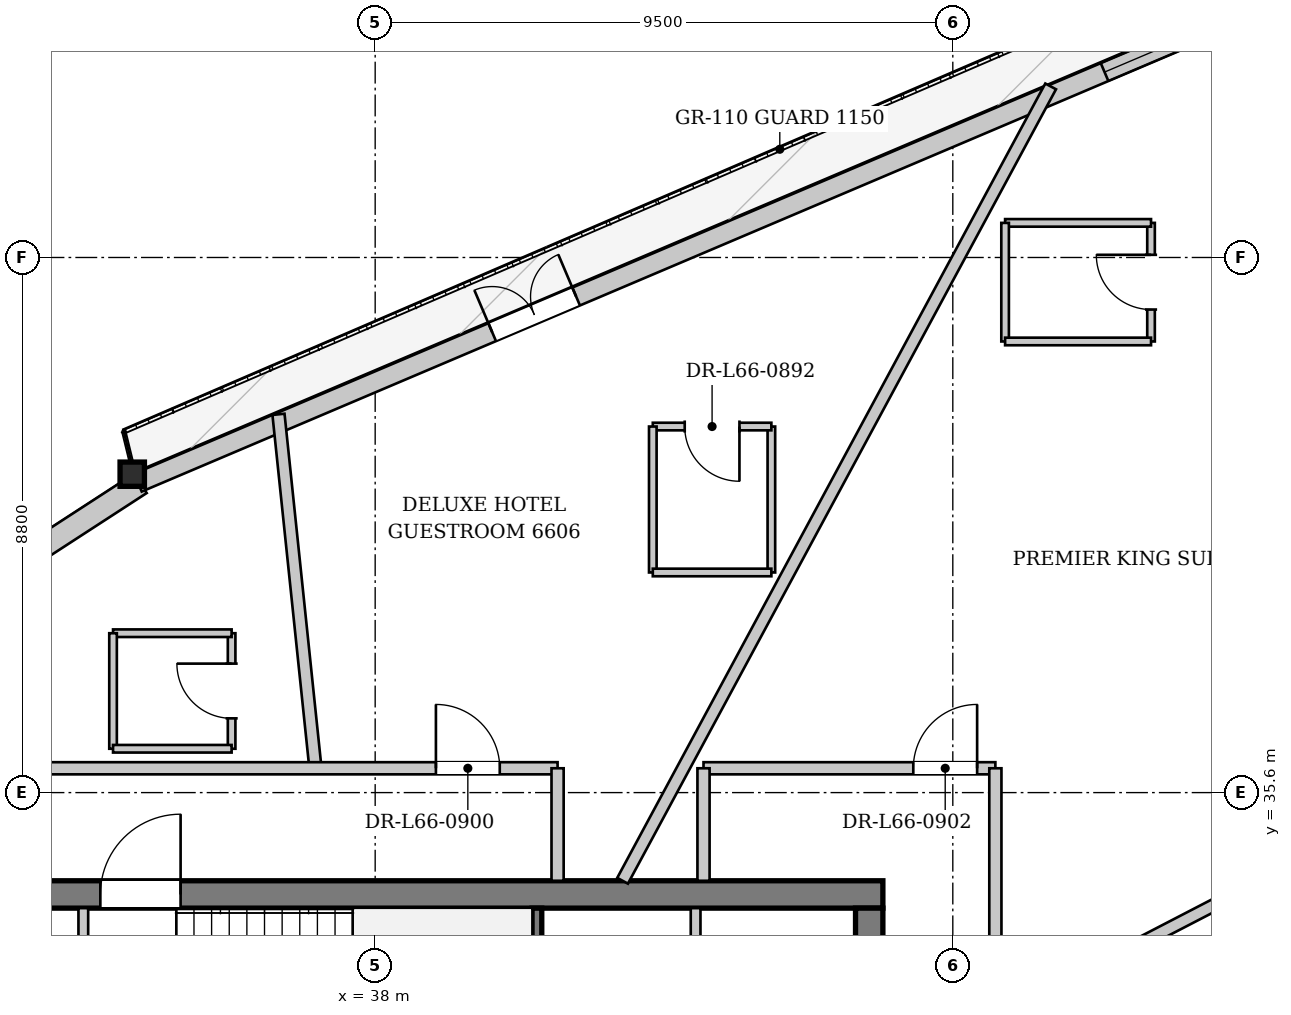
"""IFC4 building model, lengths in metres.
Left out: names, types, materials, properties, quantities, classifications, styles, units other than length and angle.
Written with IfcOpenShell. Run it as: python <this file> out.ifc"""

import sys

from ifc_helpers import new_model, si_unit, direction, frame, frame_2d, origin, origin_2d, place, context, subcontext, project, spatial, rectangle, i_section, extrude, source, transform, mapped, element, fill, save


model = new_model("IFC4")
c1 = context("Model", 3, precision=1e-05, world=origin(), true_north=direction((0.0, 1.0)))
c2 = subcontext(c1, "Body", "Model", "MODEL_VIEW")
j1 = project(units=[si_unit("LENGTHUNIT", "METRE"), si_unit("PLANEANGLEUNIT", "RADIAN")], contexts=[c1])
p1 = place(None, origin())
s1 = spatial("IfcSite", under=j1, at=p1, CompositionType="ELEMENT")
p2 = place(p1, origin())
s2 = spatial("IfcBuilding", under=s1, at=p2, CompositionType="ELEMENT")
p3 = place(p2, frame((0.0, 0.0, 248.9)))
s3 = spatial("IfcBuildingStorey", under=s2, at=p3, CompositionType="ELEMENT", Elevation=248.9)
m1 = source(origin(), c2, "Body", "SweptSolid", [
    extrude(i_section(OverallWidth=0.401, OverallDepth=0.399, WebThickness=0.022, FlangeThickness=0.034, at=origin_2d()), origin(), (0.0, 0.0, 1.0), 3.436),
])
p4 = place(p3, frame((34.036, 40.845, 0.0), z_axis=(-0.018120454418, -0.0051163636, 0.999822720264), x_axis=(0.271729070223, -0.962373790372, 0.0)))
e1 = element("IfcColumn", 1, at=p4, inside=s3, PredefinedType="COLUMN", context=c2, shape_type="MappedRepresentation", body=[
    mapped(m1, transform((0.0, 0.0, 0.0), x_axis=(1.0, 0.0, 0.0), y_axis=(0.0, 1.0, 0.0), z_axis=(0.0, 0.0, 1.0), scale=1.0)),
])
p5 = place(p3, frame((15.584, 28.637, 0.0), z_axis=(0.0, 0.0, 1.0), x_axis=(0.838692120157, 0.544605846083, 0.0)))
e2 = element("IfcWall", 2, at=p5, inside=s3, PredefinedType="SOLIDWALL", context=c2, shape_type="SweptSolid", body=[
    extrude(rectangle(XDim=22.124, YDim=0.38, at=frame_2d((11.062, 0.0))), origin(), (0.0, 0.0, 1.0), 2.872),
])
p6 = place(p5, frame((5.595, 0.0, 0.65)))
e3 = element("IfcOpeningElement", 3, at=p6, cuts=e2, PredefinedType="OPENING", context=c2, shape_type="SweptSolid", body=[
    extrude(rectangle(XDim=1.2, YDim=1.5, at=frame_2d((0.6, 0.75))), frame((0.0, 0.2, 0.0), z_axis=(0.0, -1.0, 0.0), x_axis=(1.0, 0.0, 0.0)), (0.0, 0.0, 1.0), 0.4),
])
p7 = place(p5, frame((16.929, 0.0, 0.65)))
e4 = element("IfcOpeningElement", 4, at=p7, cuts=e2, PredefinedType="OPENING", context=c2, shape_type="SweptSolid", body=[
    extrude(rectangle(XDim=1.2, YDim=1.5, at=frame_2d((0.6, 0.75))), frame((0.0, 0.2, 0.0), z_axis=(0.0, -1.0, 0.0), x_axis=(1.0, 0.0, 0.0)), (0.0, 0.0, 1.0), 0.4),
])
p8 = place(p3, frame((34.098, 40.698, 0.0), z_axis=(0.0, 0.0, 1.0), x_axis=(0.920439131347, 0.390885923877, 0.0)))
e5 = element("IfcWall", 5, at=p8, inside=s3, PredefinedType="SOLIDWALL", context=c2, shape_type="SweptSolid", body=[
    extrude(rectangle(XDim=22.124, YDim=0.32, at=frame_2d((11.062, 0.0))), origin(), (0.0, 0.0, 1.0), 2.872),
])
p9 = place(p8, frame((6.33, 0.0, 0.0)))
e6 = element("IfcOpeningElement", 6, at=p9, cuts=e5, PredefinedType="OPENING", context=c2, shape_type="SweptSolid", body=[
    extrude(rectangle(XDim=1.5, YDim=2.3, at=frame_2d((0.75, 1.15))), frame((0.0, 0.17, 0.0), z_axis=(0.0, -1.0, 0.0), x_axis=(1.0, 0.0, 0.0)), (0.0, 0.0, 1.0), 0.34),
])
p10 = place(p8, frame((17.272, 0.0, 0.402)))
e7 = element("IfcOpeningElement", 7, at=p10, cuts=e5, PredefinedType="OPENING", context=c2, shape_type="SweptSolid", body=[
    extrude(rectangle(XDim=2.6, YDim=2.35, at=frame_2d((1.3, 1.175))), frame((0.0, 0.17, 0.0), z_axis=(0.0, -1.0, 0.0), x_axis=(1.0, 0.0, 0.0)), (0.0, 0.0, 1.0), 0.34),
])
p11 = place(p3, frame((29.65, 33.925, 0.0), z_axis=(0.0, 0.0, 1.0), x_axis=(1.0, 0.0, 0.0)))
e8 = element("IfcWall", 8, at=p11, inside=s3, PredefinedType="SHEAR", context=c2, shape_type="SweptSolid", body=[
    extrude(rectangle(XDim=16.7, YDim=0.45, at=frame_2d((8.35, 0.0))), origin(), (0.0, 0.0, 1.0), 3.38),
])
p12 = place(p11, frame((1.45, 0.0, 0.0)))
e9 = element("IfcOpeningElement", 9, at=p12, cuts=e8, PredefinedType="OPENING", context=c2, shape_type="SweptSolid", body=[
    extrude(rectangle(XDim=0.95, YDim=2.1, at=frame_2d((0.475, 1.05))), frame((0.0, 0.235, 0.0), z_axis=(0.0, -1.0, 0.0), x_axis=(1.0, 0.0, 0.0)), (0.0, 0.0, 1.0), 0.47),
])
p13 = place(p11, frame((3.83, 0.0, 0.0)))
e10 = element("IfcOpeningElement", 10, at=p13, cuts=e8, PredefinedType="OPENING", context=c2, shape_type="SweptSolid", body=[
    extrude(rectangle(XDim=1.32, YDim=2.2, at=frame_2d((0.66, 1.1))), frame((0.0, 0.235, 0.0), z_axis=(0.0, -1.0, 0.0), x_axis=(1.0, 0.0, 0.0)), (0.0, 0.0, 1.0), 0.47),
])
p14 = place(p3, frame((46.125, 33.7, 0.0), z_axis=(0.0, 0.0, 1.0), x_axis=(0.0, -1.0, 0.0)))
e11 = element("IfcWall", 11, at=p14, inside=s3, PredefinedType="SHEAR", context=c2, shape_type="SweptSolid", body=[
    extrude(rectangle(XDim=14.2, YDim=0.45, at=frame_2d((7.1, 0.0))), origin(), (0.0, 0.0, 1.0), 3.38),
])
p15 = place(p14, frame((5.18, 0.0, 0.0)))
e12 = element("IfcOpeningElement", 12, at=p15, cuts=e11, PredefinedType="OPENING", context=c2, shape_type="SweptSolid", body=[
    extrude(rectangle(XDim=1.6, YDim=2.2, at=frame_2d((0.8, 1.1))), frame((0.0, 0.235, 0.0), z_axis=(0.0, -1.0, 0.0), x_axis=(1.0, 0.0, 0.0)), (0.0, 0.0, 1.0), 0.47),
])
p16 = place(p14, frame((2.05, 0.0, 0.0)))
e13 = element("IfcOpeningElement", 13, at=p16, cuts=e11, PredefinedType="OPENING", context=c2, shape_type="SweptSolid", body=[
    extrude(rectangle(XDim=0.95, YDim=2.1, at=frame_2d((0.475, 1.05))), frame((0.0, 0.235, 0.0), z_axis=(0.0, -1.0, 0.0), x_axis=(1.0, 0.0, 0.0)), (0.0, 0.0, 1.0), 0.47),
])
p17 = place(p3, frame((40.66, 30.6, 0.0), z_axis=(0.0, 0.0, 1.0), x_axis=(0.0, 1.0, 0.0)))
e14 = element("IfcWall", 14, at=p17, inside=s3, PredefinedType="PARTITIONING", context=c2, shape_type="SweptSolid", body=[
    extrude(rectangle(XDim=3.1, YDim=0.16, at=frame_2d((1.55, 0.0))), origin(), (0.0, 0.0, 1.0), 3.38),
])
p18 = place(p3, frame((33.2, 28.44, 0.0), z_axis=(0.0, 0.0, 1.0), x_axis=(0.0, 1.0, 0.0)))
e15 = element("IfcWall", 15, at=p18, inside=s3, PredefinedType="PARTITIONING", context=c2, shape_type="SweptSolid", body=[
    extrude(rectangle(XDim=5.26, YDim=0.16, at=frame_2d((2.63, 0.0))), origin(), (0.0, 0.0, 1.0), 3.38),
])
p19 = place(p3, frame((43.27, 30.68, 0.0), z_axis=(0.0, 0.0, 1.0), x_axis=(0.0, 1.0, 0.0)))
e16 = element("IfcWall", 16, at=p19, inside=s3, PredefinedType="PARTITIONING", context=c2, shape_type="SweptSolid", body=[
    extrude(rectangle(XDim=3.02, YDim=0.16, at=frame_2d((1.51, 0.0))), origin(), (0.0, 0.0, 1.0), 3.38),
])
p20 = place(p19, frame((0.95, 0.0, 0.0)))
e17 = element("IfcOpeningElement", 17, at=p20, cuts=e16, PredefinedType="OPENING", context=c2, shape_type="SweptSolid", body=[
    extrude(rectangle(XDim=0.95, YDim=2.1, at=frame_2d((0.475, 1.05))), frame((0.0, 0.09, 0.0), z_axis=(0.0, -1.0, 0.0), x_axis=(1.0, 0.0, 0.0)), (0.0, 0.0, 1.0), 0.18),
])
p21 = place(p3, frame((48.2, 31.885, 0.0), z_axis=(0.0, 0.0, 1.0), x_axis=(0.887874845761, 0.460085055468, 0.0)))
e18 = element("IfcWall", 18, at=p21, inside=s3, PredefinedType="PARTITIONING", context=c2, shape_type="SweptSolid", body=[
    extrude(rectangle(XDim=6.479, YDim=0.2, at=frame_2d((3.239, 0.0))), origin(), (0.0, 0.0, 1.0), 3.38),
])
p22 = place(p3, frame((42.069, 34.15, 0.0), z_axis=(0.0, 0.0, 1.0), x_axis=(0.474411767959, 0.880303058283, 0.0)))
e19 = element("IfcWall", 19, at=p22, inside=s3, PredefinedType="PARTITIONING", context=c2, shape_type="SweptSolid", body=[
    extrude(rectangle(XDim=14.84, YDim=0.2, at=frame_2d((7.42, 0.0))), origin(), (0.0, 0.0, 1.0), 3.38),
])
p23 = place(p3, frame((37.018, 36.0, 0.0), z_axis=(0.0, 0.0, 1.0), x_axis=(-0.103876913676, 0.994590160219, 0.0)))
e20 = element("IfcWall", 20, at=p23, inside=s3, PredefinedType="PARTITIONING", context=c2, shape_type="SweptSolid", body=[
    extrude(rectangle(XDim=5.852, YDim=0.2, at=frame_2d((2.926, 0.0))), origin(), (0.0, 0.0, 1.0), 3.38),
])
p24 = place(p3, frame((50.76, 43.019, 0.0), z_axis=(0.0, 0.0, 1.0), x_axis=(0.0, 1.0, 0.0)))
e21 = element("IfcWall", 21, at=p24, inside=s3, PredefinedType="PARTITIONING", context=c2, shape_type="SweptSolid", body=[
    extrude(rectangle(XDim=1.95, YDim=0.125, at=frame_2d((0.975, 0.0))), origin(), (0.0, 0.0, 1.0), 3.38),
])
p25 = place(p24, frame((0.525, 0.0, 0.0)))
e22 = element("IfcOpeningElement", 22, at=p25, cuts=e21, PredefinedType="OPENING", context=c2, shape_type="SweptSolid", body=[
    extrude(rectangle(XDim=0.9, YDim=2.1, at=frame_2d((0.45, 1.05))), frame((0.0, 0.073, 0.0), z_axis=(0.0, -1.0, 0.0), x_axis=(1.0, 0.0, 0.0)), (0.0, 0.0, 1.0), 0.145),
])
p26 = place(p3, frame((50.76, 44.969, 0.0), z_axis=(0.0, 0.0, 1.0), x_axis=(-1.0, 0.0, 0.0)))
e23 = element("IfcWall", 23, at=p26, inside=s3, PredefinedType="PARTITIONING", context=c2, shape_type="SweptSolid", body=[
    extrude(rectangle(XDim=2.4, YDim=0.125, at=frame_2d((1.2, 0.0))), origin(), (0.0, 0.0, 1.0), 3.38),
])
p27 = place(p3, frame((48.36, 44.969, 0.0), z_axis=(0.0, 0.0, 1.0), x_axis=(0.0, -1.0, 0.0)))
e24 = element("IfcWall", 24, at=p27, inside=s3, PredefinedType="PARTITIONING", context=c2, shape_type="SweptSolid", body=[
    extrude(rectangle(XDim=1.95, YDim=0.125, at=frame_2d((0.975, 0.0))), origin(), (0.0, 0.0, 1.0), 3.38),
])
p28 = place(p3, frame((48.36, 43.019, 0.0), z_axis=(0.0, 0.0, 1.0), x_axis=(1.0, 0.0, 0.0)))
e25 = element("IfcWall", 25, at=p28, inside=s3, PredefinedType="PARTITIONING", context=c2, shape_type="SweptSolid", body=[
    extrude(rectangle(XDim=2.4, YDim=0.125, at=frame_2d((1.2, 0.0))), origin(), (0.0, 0.0, 1.0), 3.125),
])
p29 = place(p3, frame((44.516, 39.22, 0.0), z_axis=(0.0, 0.0, 1.0), x_axis=(0.0, 1.0, 0.0)))
e26 = element("IfcWall", 26, at=p29, inside=s3, PredefinedType="PARTITIONING", context=c2, shape_type="SweptSolid", body=[
    extrude(rectangle(XDim=2.4, YDim=0.125, at=frame_2d((1.2, 0.0))), origin(), (0.0, 0.0, 1.0), 3.38),
])
p30 = place(p3, frame((44.516, 41.62, 0.0), z_axis=(0.0, 0.0, 1.0), x_axis=(-1.0, 0.0, 0.0)))
e27 = element("IfcWall", 27, at=p30, inside=s3, PredefinedType="PARTITIONING", context=c2, shape_type="SweptSolid", body=[
    extrude(rectangle(XDim=1.95, YDim=0.125, at=frame_2d((0.975, 0.0))), origin(), (0.0, 0.0, 1.0), 3.125),
])
p31 = place(p30, frame((0.525, 0.0, 0.0)))
e28 = element("IfcOpeningElement", 28, at=p31, cuts=e27, PredefinedType="OPENING", context=c2, shape_type="SweptSolid", body=[
    extrude(rectangle(XDim=0.9, YDim=2.1, at=frame_2d((0.45, 1.05))), frame((0.0, 0.073, 0.0), z_axis=(0.0, -1.0, 0.0), x_axis=(1.0, 0.0, 0.0)), (0.0, 0.0, 1.0), 0.145),
])
p32 = place(p3, frame((42.566, 41.62, 0.0), z_axis=(0.0, 0.0, 1.0), x_axis=(0.0, -1.0, 0.0)))
e29 = element("IfcWall", 29, at=p32, inside=s3, PredefinedType="PARTITIONING", context=c2, shape_type="SweptSolid", body=[
    extrude(rectangle(XDim=2.4, YDim=0.125, at=frame_2d((1.2, 0.0))), origin(), (0.0, 0.0, 1.0), 3.38),
])
p33 = place(p3, frame((42.566, 39.22, 0.0), z_axis=(0.0, 0.0, 1.0), x_axis=(1.0, 0.0, 0.0)))
e30 = element("IfcWall", 30, at=p33, inside=s3, PredefinedType="PARTITIONING", context=c2, shape_type="SweptSolid", body=[
    extrude(rectangle(XDim=1.95, YDim=0.125, at=frame_2d((0.975, 0.0))), origin(), (0.0, 0.0, 1.0), 3.38),
])
p34 = place(p3, frame((35.639, 36.321, 0.0), z_axis=(0.0, 0.0, 1.0), x_axis=(0.0, 1.0, 0.0)))
e31 = element("IfcWall", 31, at=p34, inside=s3, PredefinedType="PARTITIONING", context=c2, shape_type="SweptSolid", body=[
    extrude(rectangle(XDim=1.9, YDim=0.125, at=frame_2d((0.95, 0.0))), origin(), (0.0, 0.0, 1.0), 3.38),
])
p35 = place(p34, frame((0.5, 0.0, 0.0)))
e32 = element("IfcOpeningElement", 32, at=p35, cuts=e31, PredefinedType="OPENING", context=c2, shape_type="SweptSolid", body=[
    extrude(rectangle(XDim=0.9, YDim=2.1, at=frame_2d((0.45, 1.05))), frame((0.0, 0.073, 0.0), z_axis=(0.0, -1.0, 0.0), x_axis=(1.0, 0.0, 0.0)), (0.0, 0.0, 1.0), 0.145),
])
p36 = place(p3, frame((35.639, 38.221, 0.0), z_axis=(0.0, 0.0, 1.0), x_axis=(-1.0, 0.0, 0.0)))
e33 = element("IfcWall", 33, at=p36, inside=s3, PredefinedType="PARTITIONING", context=c2, shape_type="SweptSolid", body=[
    extrude(rectangle(XDim=1.95, YDim=0.125, at=frame_2d((0.975, 0.0))), origin(), (0.0, 0.0, 1.0), 3.125),
])
p37 = place(p3, frame((33.689, 38.221, 0.0), z_axis=(0.0, 0.0, 1.0), x_axis=(0.0, -1.0, 0.0)))
e34 = element("IfcWall", 34, at=p37, inside=s3, PredefinedType="PARTITIONING", context=c2, shape_type="SweptSolid", body=[
    extrude(rectangle(XDim=1.9, YDim=0.125, at=frame_2d((0.95, 0.0))), origin(), (0.0, 0.0, 1.0), 3.38),
])
p38 = place(p3, frame((33.689, 36.321, 0.0), z_axis=(0.0, 0.0, 1.0), x_axis=(1.0, 0.0, 0.0)))
e35 = element("IfcWall", 35, at=p38, inside=s3, PredefinedType="PARTITIONING", context=c2, shape_type="SweptSolid", body=[
    extrude(rectangle(XDim=1.95, YDim=0.125, at=frame_2d((0.975, 0.0))), origin(), (0.0, 0.0, 1.0), 3.38),
])
p39 = place(p3, frame((27.8, 36.0, 0.0), z_axis=(0.0, 0.0, 1.0), x_axis=(1.0, 0.0, 0.0)))
e36 = element("IfcWall", 36, at=p39, inside=s3, PredefinedType="PARTITIONING", context=c2, shape_type="SweptSolid", body=[
    extrude(rectangle(XDim=13.2, YDim=0.2, at=frame_2d((6.6, 0.0))), origin(), (0.0, 0.0, 1.0), 3.38),
])
p40 = place(p39, frame((11.199, 0.0, 0.0)))
e37 = element("IfcOpeningElement", 37, at=p40, cuts=e36, PredefinedType="OPENING", context=c2, shape_type="SweptSolid", body=[
    extrude(rectangle(XDim=1.05, YDim=2.2, at=frame_2d((0.525, 1.1))), frame((0.0, 0.11, 0.0), z_axis=(0.0, -1.0, 0.0), x_axis=(1.0, 0.0, 0.0)), (0.0, 0.0, 1.0), 0.22),
])
p41 = place(p39, frame((3.44, 0.0, 0.0)))
e38 = element("IfcOpeningElement", 38, at=p41, cuts=e36, PredefinedType="OPENING", context=c2, shape_type="SweptSolid", body=[
    extrude(rectangle(XDim=1.05, YDim=2.2, at=frame_2d((0.525, 1.1))), frame((0.0, 0.11, 0.0), z_axis=(0.0, -1.0, 0.0), x_axis=(1.0, 0.0, 0.0)), (0.0, 0.0, 1.0), 0.22),
])
p42 = place(p3, frame((41.0, 34.15, 0.0), z_axis=(0.0, 0.0, 1.0), x_axis=(0.0, 1.0, 0.0)))
e39 = element("IfcWall", 39, at=p42, inside=s3, PredefinedType="PARTITIONING", context=c2, shape_type="SweptSolid", body=[
    extrude(rectangle(XDim=1.85, YDim=0.2, at=frame_2d((0.925, 0.0))), origin(), (0.0, 0.0, 1.0), 3.38),
])
p43 = place(p3, frame((43.4, 36.0, 0.0), z_axis=(0.0, 0.0, 1.0), x_axis=(1.0, 0.0, 0.0)))
e40 = element("IfcWall", 40, at=p43, inside=s3, PredefinedType="PARTITIONING", context=c2, shape_type="SweptSolid", body=[
    extrude(rectangle(XDim=4.8, YDim=0.2, at=frame_2d((2.4, 0.0))), origin(), (0.0, 0.0, 1.0), 3.38),
])
p44 = place(p43, frame((3.45, 0.0, 0.0)))
e41 = element("IfcOpeningElement", 41, at=p44, cuts=e40, PredefinedType="OPENING", context=c2, shape_type="SweptSolid", body=[
    extrude(rectangle(XDim=1.05, YDim=2.2, at=frame_2d((0.525, 1.1))), frame((0.0, 0.11, 0.0), z_axis=(0.0, -1.0, 0.0), x_axis=(1.0, 0.0, 0.0)), (0.0, 0.0, 1.0), 0.22),
])
p45 = place(p3, frame((43.4, 34.15, 0.0), z_axis=(0.0, 0.0, 1.0), x_axis=(0.0, 1.0, 0.0)))
e42 = element("IfcWall", 42, at=p45, inside=s3, PredefinedType="PARTITIONING", context=c2, shape_type="SweptSolid", body=[
    extrude(rectangle(XDim=1.85, YDim=0.2, at=frame_2d((0.925, 0.0))), origin(), (0.0, 0.0, 1.0), 3.38),
])
p46 = place(p3, frame((48.2, 17.2, 0.0), z_axis=(0.0, 0.0, 1.0), x_axis=(0.0, 1.0, 0.0)))
e43 = element("IfcWall", 43, at=p46, inside=s3, PredefinedType="PARTITIONING", context=c2, shape_type="SweptSolid", body=[
    extrude(rectangle(XDim=18.8, YDim=0.2, at=frame_2d((9.4, 0.0))), origin(), (0.0, 0.0, 1.0), 3.065),
])
p47 = place(p46, frame((3.537, 0.0, 0.0)))
e44 = element("IfcOpeningElement", 44, at=p47, cuts=e43, PredefinedType="OPENING", context=c2, shape_type="SweptSolid", body=[
    extrude(rectangle(XDim=1.05, YDim=2.2, at=frame_2d((0.525, 1.1))), frame((0.0, 0.11, 0.0), z_axis=(0.0, -1.0, 0.0), x_axis=(1.0, 0.0, 0.0)), (0.0, 0.0, 1.0), 0.22),
])
p48 = place(p46, frame((10.296, 0.0, 0.0)))
e45 = element("IfcOpeningElement", 45, at=p48, cuts=e43, PredefinedType="OPENING", context=c2, shape_type="SweptSolid", body=[
    extrude(rectangle(XDim=1.05, YDim=2.2, at=frame_2d((0.525, 1.1))), frame((0.0, 0.11, 0.0), z_axis=(0.0, -1.0, 0.0), x_axis=(1.0, 0.0, 0.0)), (0.0, 0.0, 1.0), 0.22),
])
m2 = source(origin(), c2, "Body", "SweptSolid", [
    extrude(rectangle(XDim=1.5, YDim=2.3, at=frame_2d((0.75, 1.15))), frame((0.0, 0.025, 0.0), z_axis=(0.0, -1.0, 0.0), x_axis=(1.0, 0.0, 0.0)), (0.0, 0.0, 1.0), 0.05),
])
p49 = place(p9, origin())
e46 = element("IfcDoor", 46, at=p49, inside=s3, OperationType="DOUBLE_DOOR_SINGLE_SWING", PredefinedType="DOOR", context=c2, shape_type="MappedRepresentation", body=[
    mapped(m2, transform((0.0, 0.0, 0.0), x_axis=(1.0, 0.0, 0.0), y_axis=(0.0, 1.0, 0.0), z_axis=(0.0, 0.0, 1.0), scale=1.0)),
])
fill(e6, e46)
m3 = source(origin(), c2, "Body", "SweptSolid", [
    extrude(rectangle(XDim=2.6, YDim=2.35, at=frame_2d((1.3, 1.175))), frame((0.0, 0.03, 0.0), z_axis=(0.0, -1.0, 0.0), x_axis=(1.0, 0.0, 0.0)), (0.0, 0.0, 1.0), 0.06),
])
p50 = place(p10, origin())
e47 = element("IfcWindow", 47, at=p50, inside=s3, PartitioningType="SINGLE_PANEL", PredefinedType="WINDOW", context=c2, shape_type="MappedRepresentation", body=[
    mapped(m3, transform((0.0, 0.0, 0.0), x_axis=(1.0, 0.0, 0.0), y_axis=(0.0, 1.0, 0.0), z_axis=(0.0, 0.0, 1.0), scale=1.0)),
])
fill(e7, e47)
m4 = source(origin(), c2, "Body", "SweptSolid", [
    extrude(rectangle(XDim=1.32, YDim=2.2, at=frame_2d((0.66, 1.1))), frame((0.0, 0.025, 0.0), z_axis=(0.0, -1.0, 0.0), x_axis=(1.0, 0.0, 0.0)), (0.0, 0.0, 1.0), 0.05),
])
p51 = place(p13, origin())
e48 = element("IfcDoor", 48, at=p51, inside=s3, OperationType="SINGLE_SWING_RIGHT", PredefinedType="DOOR", context=c2, shape_type="MappedRepresentation", body=[
    mapped(m4, transform((0.0, 0.0, 0.0), x_axis=(1.0, 0.0, 0.0), y_axis=(0.0, 1.0, 0.0), z_axis=(0.0, 0.0, 1.0), scale=1.0)),
])
fill(e10, e48)
m5 = source(origin(), c2, "Body", "SweptSolid", [
    extrude(rectangle(XDim=0.9, YDim=2.1, at=frame_2d((0.45, 1.05))), frame((0.0, 0.025, 0.0), z_axis=(0.0, -1.0, 0.0), x_axis=(1.0, 0.0, 0.0)), (0.0, 0.0, 1.0), 0.05),
])
p52 = place(p25, origin())
e49 = element("IfcDoor", 49, at=p52, inside=s3, OperationType="SINGLE_SWING_RIGHT", PredefinedType="DOOR", context=c2, shape_type="MappedRepresentation", body=[
    mapped(m5, transform((0.0, 0.0, 0.0), x_axis=(1.0, 0.0, 0.0), y_axis=(0.0, 1.0, 0.0), z_axis=(0.0, 0.0, 1.0), scale=1.0)),
])
fill(e22, e49)
p53 = place(p31, origin())
e50 = element("IfcDoor", 50, at=p53, inside=s3, OperationType="SINGLE_SWING_LEFT", PredefinedType="DOOR", context=c2, shape_type="MappedRepresentation", body=[
    mapped(m5, transform((0.0, 0.0, 0.0), x_axis=(1.0, 0.0, 0.0), y_axis=(0.0, 1.0, 0.0), z_axis=(0.0, 0.0, 1.0), scale=1.0)),
])
fill(e28, e50)
p54 = place(p35, origin())
e51 = element("IfcDoor", 51, at=p54, inside=s3, OperationType="SINGLE_SWING_RIGHT", PredefinedType="DOOR", context=c2, shape_type="MappedRepresentation", body=[
    mapped(m5, transform((0.0, 0.0, 0.0), x_axis=(1.0, 0.0, 0.0), y_axis=(0.0, 1.0, 0.0), z_axis=(0.0, 0.0, 1.0), scale=1.0)),
])
fill(e32, e51)
m6 = source(origin(), c2, "Body", "SweptSolid", [
    extrude(rectangle(XDim=1.05, YDim=2.2, at=frame_2d((0.525, 1.1))), frame((0.0, 0.025, 0.0), z_axis=(0.0, -1.0, 0.0), x_axis=(1.0, 0.0, 0.0)), (0.0, 0.0, 1.0), 0.05),
])
p55 = place(p40, origin())
e52 = element("IfcDoor", 52, at=p55, inside=s3, OperationType="SINGLE_SWING_LEFT", PredefinedType="DOOR", context=c2, shape_type="MappedRepresentation", body=[
    mapped(m6, transform((0.0, 0.0, 0.0), x_axis=(1.0, 0.0, 0.0), y_axis=(0.0, 1.0, 0.0), z_axis=(0.0, 0.0, 1.0), scale=1.0)),
])
fill(e37, e52)
p56 = place(p44, origin())
e53 = element("IfcDoor", 53, at=p56, inside=s3, OperationType="SINGLE_SWING_RIGHT", PredefinedType="DOOR", context=c2, shape_type="MappedRepresentation", body=[
    mapped(m6, transform((0.0, 0.0, 0.0), x_axis=(1.0, 0.0, 0.0), y_axis=(0.0, 1.0, 0.0), z_axis=(0.0, 0.0, 1.0), scale=1.0)),
])
fill(e41, e53)
save(model, sys.argv[1])
